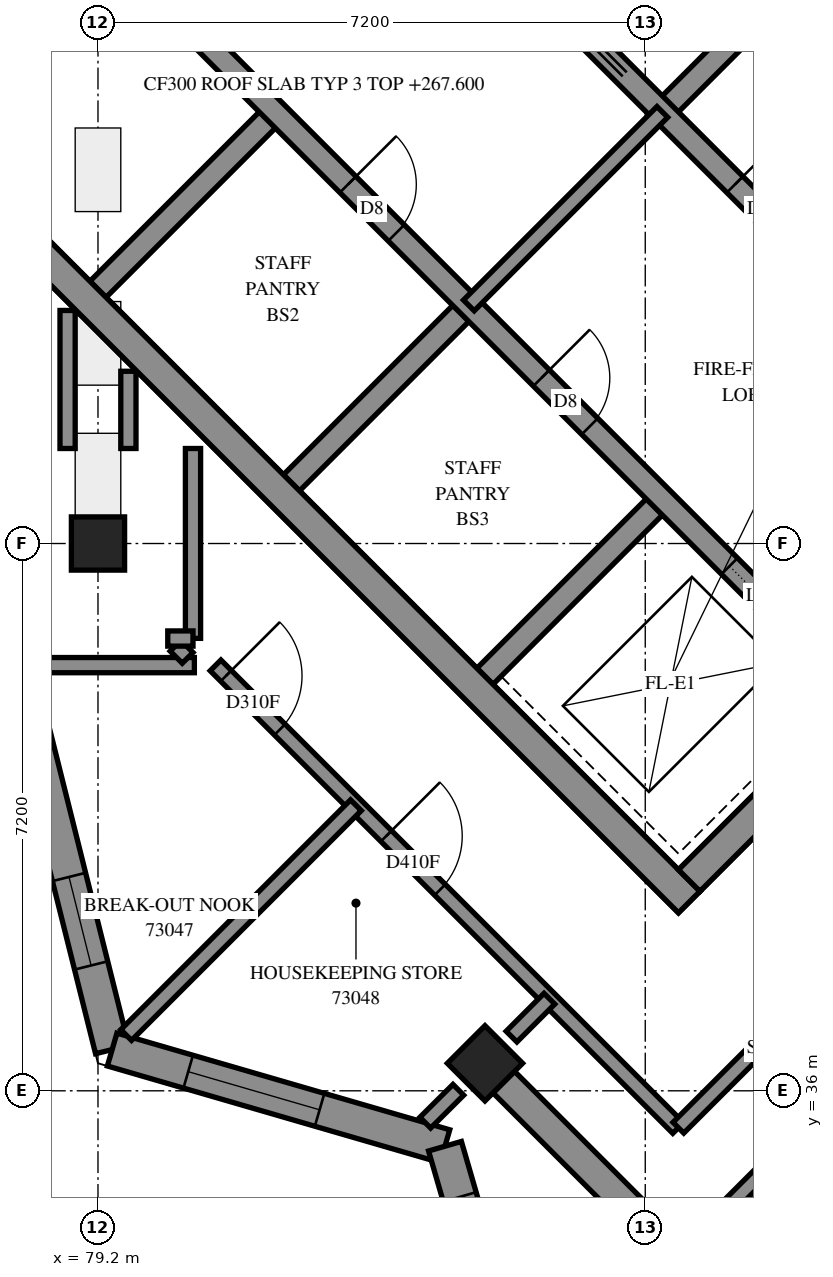
"""IFC4 building model, lengths in metres.
Left out: names, types, materials, properties, quantities, classifications, styles, units other than length and angle.
Written with IfcOpenShell. Run it as: python <this file> out.ifc"""

import sys

from ifc_helpers import new_model, si_unit, direction, frame, frame_2d, origin, origin_2d, place, context, subcontext, project, spatial, polyline, rectangle, outline, extrude, element, fill, save


model = new_model("IFC4")
c1 = context("Model", 3, precision=1e-05, world=origin(), true_north=direction((0.0, 1.0)))
c2 = subcontext(c1, "Body", "Model", "MODEL_VIEW")
j1 = project(units=[si_unit("LENGTHUNIT", "METRE"), si_unit("PLANEANGLEUNIT", "RADIAN")], contexts=[c1])
p1 = place(None, origin())
s1 = spatial("IfcSite", under=j1, at=p1, CompositionType="ELEMENT")
p2 = place(p1, origin())
s2 = spatial("IfcBuilding", under=s1, at=p2, CompositionType="ELEMENT")
p3 = place(p2, frame((0.0, 0.0, 267.6)))
s3 = spatial("IfcBuildingStorey", under=s2, at=p3, CompositionType="ELEMENT", Elevation=267.6)
for number, where, z_axis, x_axis in (
    (1, (79.2, 43.2, 0.0), (0.0, 0.0, 1.0), (1.0, 0.0, 0.0)),
    (2, (84.291, 36.362, 0.0), (0.0, 0.0, 1.0), (0.707, -0.707, 0.0)),
):
    element("IfcColumn", number, at=place(p3, frame(where, z_axis=z_axis, x_axis=x_axis)), inside=s3, PredefinedType="COLUMN", context=c2, shape_type="SweptSolid", body=[
        extrude(rectangle(XDim=0.7, YDim=0.7, at=origin_2d()), origin(), (0.0, 0.0, 1.0), 3.1),
    ])
p4 = place(p3, frame((76.23, 49.231, -0.3), z_axis=(0.0, 0.0, 1.0), x_axis=(0.7071034917, -0.7071100706, 0.0)))
e3 = element("IfcWall", 3, at=p4, inside=s3, PredefinedType="SHEAR", context=c2, shape_type="SweptSolid", body=[
    extrude(rectangle(XDim=15.2, YDim=0.4, at=frame_2d((7.6, 0.0))), origin(), (0.0, 0.0, 1.0), 2.7),
])
p5 = place(p3, frame((86.695, 59.696, -0.3), z_axis=(0.0, 0.0, 1.0), x_axis=(0.7071100706, -0.7071034917, 0.0)))
e4 = element("IfcWall", 4, at=p5, inside=s3, PredefinedType="SHEAR", context=c2, shape_type="SweptSolid", body=[
    extrude(rectangle(XDim=15.2, YDim=0.4, at=frame_2d((7.6, 0.0))), origin(), (0.0, 0.0, 1.0), 2.7),
])
p6 = place(p5, frame((10.4, 0.0, 0.3)))
e5 = element("IfcOpeningElement", 5, at=p6, cuts=e4, PredefinedType="OPENING", context=c2, shape_type="SweptSolid", body=[
    extrude(rectangle(XDim=0.8, YDim=2.1, at=frame_2d((0.4, 1.05))), frame((0.0, 0.21, 0.0), z_axis=(0.0, -1.0, 0.0), x_axis=(1.0, 0.0, 0.0)), (0.0, 0.0, 1.0), 0.42),
])
p7 = place(p3, frame((76.513, 49.231, -0.3), z_axis=(0.0, 0.0, 1.0), x_axis=(0.7071067812, 0.7071067812, 0.0)))
e6 = element("IfcWall", 6, at=p7, inside=s3, PredefinedType="SHEAR", context=c2, shape_type="SweptSolid", body=[
    extrude(rectangle(XDim=14.4, YDim=0.4, at=frame_2d((7.2, 0.0))), origin(), (0.0, 0.0, 1.0), 2.7),
])
p8 = place(p7, frame((5.65, 0.0, 0.3)))
e7 = element("IfcOpeningElement", 7, at=p8, cuts=e6, PredefinedType="OPENING", context=c2, shape_type="SweptSolid", body=[
    extrude(rectangle(XDim=1.1, YDim=2.1, at=frame_2d((0.55, 1.05))), frame((0.0, 0.21, 0.0), z_axis=(0.0, -1.0, 0.0), x_axis=(1.0, 0.0, 0.0)), (0.0, 0.0, 1.0), 0.42),
])
p9 = place(p7, frame((11.35, 0.0, 0.3)))
e8 = element("IfcOpeningElement", 8, at=p9, cuts=e6, PredefinedType="OPENING", context=c2, shape_type="SweptSolid", body=[
    extrude(rectangle(XDim=1.1, YDim=2.1, at=frame_2d((0.55, 1.05))), frame((0.0, 0.21, 0.0), z_axis=(0.0, -1.0, 0.0), x_axis=(1.0, 0.0, 0.0)), (0.0, 0.0, 1.0), 0.42),
])
p10 = place(p7, frame((0.25, 0.0, 0.0)))
e9 = element("IfcOpeningElement", 9, at=p10, cuts=e6, PredefinedType="OPENING", context=c2, shape_type="SweptSolid", body=[
    extrude(rectangle(XDim=0.9, YDim=2.1, at=frame_2d((0.45, 1.05))), frame((0.0, 0.21, 0.0), z_axis=(0.0, -1.0, 0.0), x_axis=(1.0, 0.0, 0.0)), (0.0, 0.0, 1.0), 0.42),
])
p11 = place(p3, frame((86.978, 38.766, -0.3), z_axis=(0.0, 0.0, 1.0), x_axis=(0.7071067812, 0.7071067812, 0.0)))
e10 = element("IfcWall", 10, at=p11, inside=s3, PredefinedType="SHEAR", context=c2, shape_type="SweptSolid", body=[
    extrude(rectangle(XDim=14.4, YDim=0.4, at=frame_2d((7.2, 0.0))), origin(), (0.0, 0.0, 1.0), 2.7),
])
p12 = place(p11, frame((4.55, 0.0, 0.3)))
e11 = element("IfcOpeningElement", 11, at=p12, cuts=e10, PredefinedType="OPENING", context=c2, shape_type="SweptSolid", body=[
    extrude(rectangle(XDim=1.1, YDim=2.1, at=frame_2d((0.55, 1.05))), frame((0.0, 0.21, 0.0), z_axis=(0.0, -1.0, 0.0), x_axis=(1.0, 0.0, 0.0)), (0.0, 0.0, 1.0), 0.42),
])
p13 = place(p11, frame((11.35, 0.0, 0.3)))
e12 = element("IfcOpeningElement", 12, at=p13, cuts=e10, PredefinedType="OPENING", context=c2, shape_type="SweptSolid", body=[
    extrude(rectangle(XDim=1.1, YDim=2.1, at=frame_2d((0.55, 1.05))), frame((0.0, 0.21, 0.0), z_axis=(0.0, -1.0, 0.0), x_axis=(1.0, 0.0, 0.0)), (0.0, 0.0, 1.0), 0.42),
])
p14 = place(p3, frame((79.2, 46.544, 0.0), z_axis=(0.0, 0.0, 1.0), x_axis=(0.7071219326, 0.7070916295, 0.0)))
e13 = element("IfcWall", 13, at=p14, inside=s3, PredefinedType="SOLIDWALL", context=c2, shape_type="SweptSolid", body=[
    extrude(rectangle(XDim=3.3, YDim=0.3, at=frame_2d((1.65, 0.0))), origin(), (0.0, 0.0, 1.0), 3.1),
])
p15 = place(p3, frame((81.746, 43.999, 0.0), z_axis=(0.0, 0.0, 1.0), x_axis=(0.7071067812, 0.7071067812, 0.0)))
e14 = element("IfcWall", 14, at=p15, inside=s3, PredefinedType="SOLIDWALL", context=c2, shape_type="SweptSolid", body=[
    extrude(rectangle(XDim=3.3, YDim=0.3, at=frame_2d((1.65, 0.0))), origin(), (0.0, 0.0, 1.0), 3.1),
])
p16 = place(p3, frame((86.625, 48.878, 0.0), z_axis=(0.0, 0.0, 1.0), x_axis=(0.7071067812, 0.7071067812, 0.0)))
e15 = element("IfcWall", 15, at=p16, inside=s3, PredefinedType="SOLIDWALL", context=c2, shape_type="SweptSolid", body=[
    extrude(rectangle(XDim=3.3, YDim=0.3, at=frame_2d((1.65, 0.0))), origin(), (0.0, 0.0, 1.0), 3.1),
])
p17 = place(p3, frame((84.291, 41.453, 0.0), z_axis=(0.0, 0.0, 1.0), x_axis=(0.7071067812, 0.7071067812, 0.0)))
e16 = element("IfcWall", 16, at=p17, inside=s3, PredefinedType="SOLIDWALL", context=c2, shape_type="SweptSolid", body=[
    extrude(rectangle(XDim=3.3, YDim=0.3, at=frame_2d((1.65, 0.0))), origin(), (0.0, 0.0, 1.0), 3.1),
])
p18 = place(p3, frame((78.988, 51.423, 0.0), z_axis=(0.0, 0.0, 1.0), x_axis=(0.7071067812, -0.7071067812, 0.0)))
e17 = element("IfcWall", 17, at=p18, inside=s3, PredefinedType="SOLIDWALL", context=c2, shape_type="SweptSolid", body=[
    extrude(rectangle(XDim=14.4, YDim=0.3, at=frame_2d((7.2, 0.0))), origin(), (0.0, 0.0, 1.0), 3.1),
])
p19 = place(p18, frame((4.95, 0.0, 0.0)))
e18 = element("IfcOpeningElement", 18, at=p19, cuts=e17, PredefinedType="OPENING", context=c2, shape_type="SweptSolid", body=[
    extrude(rectangle(XDim=0.9, YDim=2.1, at=frame_2d((0.45, 1.05))), frame((0.0, 0.16, 0.0), z_axis=(0.0, -1.0, 0.0), x_axis=(1.0, 0.0, 0.0)), (0.0, 0.0, 1.0), 0.32),
])
p20 = place(p18, frame((8.55, 0.0, 0.0)))
e19 = element("IfcOpeningElement", 19, at=p20, cuts=e17, PredefinedType="OPENING", context=c2, shape_type="SweptSolid", body=[
    extrude(rectangle(XDim=0.9, YDim=2.1, at=frame_2d((0.45, 1.05))), frame((0.0, 0.16, 0.0), z_axis=(0.0, -1.0, 0.0), x_axis=(1.0, 0.0, 0.0)), (0.0, 0.0, 1.0), 0.32),
])
p21 = place(p18, frame((12.05, 0.0, 0.0)))
e20 = element("IfcOpeningElement", 20, at=p21, cuts=e17, PredefinedType="OPENING", context=c2, shape_type="SweptSolid", body=[
    extrude(rectangle(XDim=1.1, YDim=2.1, at=frame_2d((0.55, 1.05))), frame((0.0, 0.16, 0.0), z_axis=(0.0, -1.0, 0.0), x_axis=(1.0, 0.0, 0.0)), (0.0, 0.0, 1.0), 0.32),
])
p22 = place(p3, frame((81.534, 53.969, 0.0), z_axis=(0.0, 0.0, 1.0), x_axis=(0.707103309, -0.7071102534, 0.0)))
e21 = element("IfcWall", 21, at=p22, inside=s3, PredefinedType="SOLIDWALL", context=c2, shape_type="SweptSolid", body=[
    extrude(rectangle(XDim=14.4, YDim=0.3, at=frame_2d((7.2, 0.0))), origin(), (0.0, 0.0, 1.0), 3.1),
])
p23 = place(p22, frame((8.55, 0.0, 0.0)))
e22 = element("IfcOpeningElement", 22, at=p23, cuts=e21, PredefinedType="OPENING", context=c2, shape_type="SweptSolid", body=[
    extrude(rectangle(XDim=0.9, YDim=2.1, at=frame_2d((0.45, 1.05))), frame((0.0, 0.16, 0.0), z_axis=(0.0, -1.0, 0.0), x_axis=(1.0, 0.0, 0.0)), (0.0, 0.0, 1.0), 0.32),
])
p24 = place(p22, frame((1.25, 0.0, 0.0)))
e23 = element("IfcOpeningElement", 23, at=p24, cuts=e21, PredefinedType="OPENING", context=c2, shape_type="SweptSolid", body=[
    extrude(rectangle(XDim=1.1, YDim=2.1, at=frame_2d((0.55, 1.05))), frame((0.0, 0.16, 0.0), z_axis=(0.0, -1.0, 0.0), x_axis=(1.0, 0.0, 0.0)), (0.0, 0.0, 1.0), 0.32),
])
p25 = place(p22, frame((4.85, 0.0, 0.0)))
e24 = element("IfcOpeningElement", 24, at=p25, cuts=e21, PredefinedType="OPENING", context=c2, shape_type="SweptSolid", body=[
    extrude(rectangle(XDim=1.1, YDim=2.1, at=frame_2d((0.55, 1.05))), frame((0.0, 0.16, 0.0), z_axis=(0.0, -1.0, 0.0), x_axis=(1.0, 0.0, 0.0)), (0.0, 0.0, 1.0), 0.32),
])
p26 = place(p22, frame((12.05, 0.0, 0.0)))
e25 = element("IfcOpeningElement", 25, at=p26, cuts=e21, PredefinedType="OPENING", context=c2, shape_type="SweptSolid", body=[
    extrude(rectangle(XDim=1.1, YDim=2.1, at=frame_2d((0.55, 1.05))), frame((0.0, 0.16, 0.0), z_axis=(0.0, -1.0, 0.0), x_axis=(1.0, 0.0, 0.0)), (0.0, 0.0, 1.0), 0.32),
])
p27 = place(p3, frame((78.255, 41.066, 0.0), z_axis=(0.0, 0.0, 1.0), x_axis=(0.2425709501, -0.9701336682, 0.0)))
e26 = element("IfcWall", 26, at=p27, inside=s3, PredefinedType="SOLIDWALL", context=c2, shape_type="SweptSolid", body=[
    extrude(outline(polyline([(0.127, -0.225), (4.792, -0.225), (4.533, 0.225), (-0.127, 0.225), (0.127, -0.225)])), origin(), (0.0, 0.0, 1.0), 3.1),
])
p28 = place(p27, frame((2.322, 0.0, 0.45)))
e27 = element("IfcOpeningElement", 27, at=p28, cuts=e26, PredefinedType="OPENING", context=c2, shape_type="SweptSolid", body=[
    extrude(rectangle(XDim=1.2, YDim=2.55, at=frame_2d((0.6, 1.275))), frame((0.0, 0.235, 0.0), z_axis=(0.0, -1.0, 0.0), x_axis=(1.0, 0.0, 0.0)), (0.0, 0.0, 1.0), 0.47),
])
p29 = place(p3, frame((79.386, 36.542, 0.0), z_axis=(0.0, 0.0, 1.0), x_axis=(0.9603399755, -0.278831726, 0.0)))
e28 = element("IfcWall", 28, at=p29, inside=s3, PredefinedType="SOLIDWALL", context=c2, shape_type="SweptSolid", body=[
    extrude(outline(polyline([(-0.129, -0.225), (4.436, -0.225), (4.684, 0.225), (0.129, 0.225), (-0.129, -0.225)])), origin(), (0.0, 0.0, 1.0), 2.6),
])
p30 = place(p29, frame((1.042, 0.0, 0.6)))
e29 = element("IfcOpeningElement", 29, at=p30, cuts=e28, PredefinedType="OPENING", context=c2, shape_type="SweptSolid", body=[
    extrude(rectangle(XDim=1.8, YDim=1.9, at=frame_2d((0.9, 0.95))), frame((0.0, 0.235, 0.0), z_axis=(0.0, -1.0, 0.0), x_axis=(1.0, 0.0, 0.0)), (0.0, 0.0, 1.0), 0.47),
])
p31 = place(p3, frame((83.765, 35.271, 0.0), z_axis=(0.0, 0.0, 1.0), x_axis=(0.278831726, -0.9603399755, 0.0)))
e30 = element("IfcWall", 30, at=p31, inside=s3, PredefinedType="SOLIDWALL", context=c2, shape_type="SweptSolid", body=[
    extrude(outline(polyline([(0.124, -0.225), (4.689, -0.225), (4.43, 0.225), (-0.124, 0.225), (0.124, -0.225)])), origin(), (0.0, 0.0, 1.0), 2.6),
])
p32 = place(p31, frame((0.695, 0.0, 0.6)))
e31 = element("IfcOpeningElement", 31, at=p32, cuts=e30, PredefinedType="OPENING", context=c2, shape_type="SweptSolid", body=[
    extrude(rectangle(XDim=1.8, YDim=1.9, at=frame_2d((0.9, 0.95))), frame((0.0, 0.235, 0.0), z_axis=(0.0, -1.0, 0.0), x_axis=(1.0, 0.0, 0.0)), (0.0, 0.0, 1.0), 0.47),
])
p33 = place(p3, frame((84.079, 46.332, 0.0), z_axis=(0.0, 0.0, 1.0), x_axis=(0.7071067812, 0.7071067812, 0.0)))
e32 = element("IfcWall", 32, at=p33, inside=s3, PredefinedType="PARTITIONING", context=c2, shape_type="SweptSolid", body=[
    extrude(rectangle(XDim=3.6, YDim=0.2, at=frame_2d((1.8, 0.0))), origin(), (0.0, 0.0, 1.0), 3.1),
])
p34 = place(p3, frame((84.965, 31.946, 0.0), z_axis=(0.0, 0.0, 1.0), x_axis=(0.7070265824, 0.7071869709, 0.0)))
e33 = element("IfcWall", 33, at=p34, inside=s3, PredefinedType="PARTITIONING", context=c2, shape_type="SweptSolid", body=[
    extrude(rectangle(XDim=11.846, YDim=0.2, at=frame_2d((5.923, 0.0))), origin(), (0.0, 0.0, 1.0), 3.1),
])
p35 = place(p3, frame((80.747, 41.597, 0.0), z_axis=(0.0, 0.0, 1.0), x_axis=(0.7071067812, -0.7071067812, 0.0)))
e34 = element("IfcWall", 34, at=p35, inside=s3, PredefinedType="PARTITIONING", context=c2, shape_type="SweptSolid", body=[
    extrude(rectangle(XDim=8.607, YDim=0.2, at=frame_2d((4.303, 0.0))), origin(), (0.0, 0.0, 1.0), 3.1),
])
p36 = place(p35, frame((0.195, 0.0, 0.0)))
e35 = element("IfcOpeningElement", 35, at=p36, cuts=e34, PredefinedType="OPENING", context=c2, shape_type="SweptSolid", body=[
    extrude(rectangle(XDim=1.0, YDim=2.1, at=frame_2d((0.5, 1.05))), frame((0.0, 0.11, 0.0), z_axis=(0.0, -1.0, 0.0), x_axis=(1.0, 0.0, 0.0)), (0.0, 0.0, 1.0), 0.22),
])
p37 = place(p35, frame((3.175, 0.0, 0.0)))
e36 = element("IfcOpeningElement", 36, at=p37, cuts=e34, PredefinedType="OPENING", context=c2, shape_type="SweptSolid", body=[
    extrude(rectangle(XDim=1.0, YDim=2.1, at=frame_2d((0.5, 1.05))), frame((0.0, 0.11, 0.0), z_axis=(0.0, -1.0, 0.0), x_axis=(1.0, 0.0, 0.0)), (0.0, 0.0, 1.0), 0.22),
])
p38 = place(p3, frame((86.836, 35.514, 0.0), z_axis=(0.0, 0.0, 1.0), x_axis=(0.7071067812, 0.7071067812, 0.0)))
e37 = element("IfcWall", 37, at=p38, inside=s3, PredefinedType="PARTITIONING", context=c2, shape_type="SweptSolid", body=[
    extrude(rectangle(XDim=7.999, YDim=0.2, at=frame_2d((3.999, 0.0))), origin(), (0.0, 0.0, 1.0), 3.1),
])
p39 = place(p38, frame((6.742, 0.0, 0.0)))
e38 = element("IfcOpeningElement", 38, at=p39, cuts=e37, PredefinedType="OPENING", context=c2, shape_type="SweptSolid", body=[
    extrude(rectangle(XDim=1.0, YDim=2.1, at=frame_2d((0.5, 1.05))), frame((0.0, 0.11, 0.0), z_axis=(0.0, -1.0, 0.0), x_axis=(1.0, 0.0, 0.0)), (0.0, 0.0, 1.0), 0.22),
])
p40 = place(p3, frame((79.57, 36.734, 0.0), z_axis=(0.0, 0.0, 1.0), x_axis=(0.7071184771, 0.7070950851, 0.0)))
e39 = element("IfcWall", 39, at=p40, inside=s3, PredefinedType="PARTITIONING", context=c2, shape_type="SweptSolid", body=[
    extrude(rectangle(XDim=4.275, YDim=0.2, at=frame_2d((2.138, 0.0))), origin(), (0.0, 0.0, 1.0), 3.1),
])
p41 = place(p3, frame((77.335, 41.6, 0.0), z_axis=(0.0, 0.0, 1.0), x_axis=(1.0, 0.0, 0.0)))
e40 = element("IfcWall", 40, at=p41, inside=s3, PredefinedType="PARTITIONING", context=c2, shape_type="SweptSolid", body=[
    extrude(rectangle(XDim=3.132, YDim=0.2, at=frame_2d((1.566, 0.0))), origin(), (0.0, 0.0, 1.0), 3.1),
])
p42 = place(p3, frame((80.45, 41.952, 0.0), z_axis=(0.0, 0.0, 1.0), x_axis=(0.0, 1.0, 0.0)))
e41 = element("IfcWall", 41, at=p42, inside=s3, PredefinedType="PARTITIONING", context=c2, shape_type="SweptSolid", body=[
    extrude(rectangle(XDim=2.498, YDim=0.2, at=frame_2d((1.249, 0.0))), origin(), (0.0, 0.0, 1.0), 3.1),
])
p43 = place(p3, frame((78.8, 44.45, 0.0), z_axis=(0.0, 0.0, 1.0), x_axis=(0.0, 1.0, 0.0)))
e42 = element("IfcWall", 42, at=p43, inside=s3, PredefinedType="PARTITIONING", context=c2, shape_type="SweptSolid", body=[
    extrude(rectangle(XDim=1.816, YDim=0.2, at=frame_2d((0.908, 0.0))), origin(), (0.0, 0.0, 1.0), 3.1),
])
p44 = place(p3, frame((79.6, 44.45, 0.0), z_axis=(0.0, 0.0, 1.0), x_axis=(0.0, 1.0, 0.0)))
e43 = element("IfcWall", 43, at=p44, inside=s3, PredefinedType="PARTITIONING", context=c2, shape_type="SweptSolid", body=[
    extrude(rectangle(XDim=1.016, YDim=0.2, at=frame_2d((0.508, 0.0))), origin(), (0.0, 0.0, 1.0), 3.1),
])
p45 = place(p3, frame((84.641, 36.713, 0.0), z_axis=(0.0, 0.0, 1.0), x_axis=(0.7071067812, 0.7071067812, 0.0)))
e44 = element("IfcWall", 44, at=p45, inside=s3, PredefinedType="PARTITIONING", context=c2, shape_type="SweptSolid", body=[
    extrude(rectangle(XDim=0.704, YDim=0.2, at=frame_2d((0.352, 0.0))), origin(), (0.0, 0.0, 1.0), 3.1),
])
p46 = place(p3, frame((83.506, 35.581, 0.0), z_axis=(0.0, 0.0, 1.0), x_axis=(0.7089790393, 0.7052295526, 0.0)))
e45 = element("IfcWall", 45, at=p46, inside=s3, PredefinedType="PARTITIONING", context=c2, shape_type="SweptSolid", body=[
    extrude(rectangle(XDim=0.613, YDim=0.2, at=frame_2d((0.307, 0.0))), origin(), (0.0, 0.0, 1.0), 2.6),
])
p47 = place(p3, frame((80.221, 41.855, 0.0), z_axis=(0.0, 0.0, 1.0), x_axis=(0.7068844555, -0.707329037, 0.0)))
e46 = element("IfcWall", 46, at=p47, inside=s3, PredefinedType="PARTITIONING", context=c2, shape_type="SweptSolid", body=[
    extrude(rectangle(XDim=0.225, YDim=0.2, at=frame_2d((0.112, 0.0))), origin(), (0.0, 0.0, 1.0), 3.1),
])
p48 = place(p3, frame((80.118, 41.95, 0.0), z_axis=(0.0, 0.0, 1.0), x_axis=(1.0, 0.0, 0.0)))
e47 = element("IfcWall", 47, at=p48, inside=s3, PredefinedType="PARTITIONING", context=c2, shape_type="SweptSolid", body=[
    extrude(rectangle(XDim=0.332, YDim=0.2, at=frame_2d((0.166, 0.0))), origin(), (0.0, 0.0, 1.0), 3.1),
])
p49 = place(p28, origin())
e48 = element("IfcWindow", 48, at=p49, inside=s3, PartitioningType="SINGLE_PANEL", PredefinedType="WINDOW", context=c2, shape_type="SweptSolid", body=[
    extrude(rectangle(XDim=1.2, YDim=2.55, at=frame_2d((0.6, 1.275))), frame((0.0, 0.205, 0.0), z_axis=(0.0, -1.0, 0.0), x_axis=(1.0, 0.0, 0.0)), (0.0, 0.0, 1.0), 0.06),
])
fill(e27, e48)
p50 = place(p30, origin())
e49 = element("IfcWindow", 49, at=p50, inside=s3, PartitioningType="SINGLE_PANEL", PredefinedType="WINDOW", context=c2, shape_type="SweptSolid", body=[
    extrude(rectangle(XDim=1.8, YDim=1.9, at=frame_2d((0.9, 0.95))), frame((0.0, 0.205, 0.0), z_axis=(0.0, -1.0, 0.0), x_axis=(1.0, 0.0, 0.0)), (0.0, 0.0, 1.0), 0.06),
])
fill(e29, e49)
p51 = place(p32, origin())
e50 = element("IfcWindow", 50, at=p51, inside=s3, PartitioningType="SINGLE_PANEL", PredefinedType="WINDOW", context=c2, shape_type="SweptSolid", body=[
    extrude(rectangle(XDim=1.8, YDim=1.9, at=frame_2d((0.9, 0.95))), frame((0.0, 0.205, 0.0), z_axis=(0.0, -1.0, 0.0), x_axis=(1.0, 0.0, 0.0)), (0.0, 0.0, 1.0), 0.06),
])
fill(e31, e50)
p52 = place(p19, origin())
e51 = element("IfcDoor", 51, at=p52, inside=s3, OperationType="SINGLE_SWING_LEFT", PredefinedType="DOOR", context=c2, shape_type="SweptSolid", body=[
    extrude(rectangle(XDim=0.9, YDim=2.1, at=frame_2d((0.45, 1.05))), frame((0.0, 0.025, 0.0), z_axis=(0.0, -1.0, 0.0), x_axis=(1.0, 0.0, 0.0)), (0.0, 0.0, 1.0), 0.05),
])
fill(e18, e51)
p53 = place(p20, origin())
e52 = element("IfcDoor", 52, at=p53, inside=s3, OperationType="SINGLE_SWING_LEFT", PredefinedType="DOOR", context=c2, shape_type="SweptSolid", body=[
    extrude(rectangle(XDim=0.9, YDim=2.1, at=frame_2d((0.45, 1.05))), frame((0.0, 0.025, 0.0), z_axis=(0.0, -1.0, 0.0), x_axis=(1.0, 0.0, 0.0)), (0.0, 0.0, 1.0), 0.05),
])
fill(e19, e52)
p54 = place(p23, origin())
e53 = element("IfcDoor", 53, at=p54, inside=s3, OperationType="SINGLE_SWING_LEFT", PredefinedType="DOOR", context=c2, shape_type="SweptSolid", body=[
    extrude(rectangle(XDim=0.9, YDim=2.1, at=frame_2d((0.45, 1.05))), frame((0.0, 0.025, 0.0), z_axis=(0.0, -1.0, 0.0), x_axis=(1.0, 0.0, 0.0)), (0.0, 0.0, 1.0), 0.05),
])
fill(e22, e53)
p55 = place(p21, origin())
e54 = element("IfcDoor", 54, at=p55, inside=s3, OperationType="SLIDING_TO_RIGHT", PredefinedType="DOOR", context=c2, shape_type="SweptSolid", body=[
    extrude(rectangle(XDim=1.1, YDim=2.1, at=frame_2d((0.55, 1.05))), frame((0.0, 0.025, 0.0), z_axis=(0.0, -1.0, 0.0), x_axis=(1.0, 0.0, 0.0)), (0.0, 0.0, 1.0), 0.05),
])
fill(e20, e54)
p56 = place(p36, origin())
e55 = element("IfcDoor", 55, at=p56, inside=s3, OperationType="SINGLE_SWING_LEFT", PredefinedType="DOOR", context=c2, shape_type="SweptSolid", body=[
    extrude(rectangle(XDim=1.0, YDim=2.1, at=frame_2d((0.5, 1.05))), frame((0.0, 0.025, 0.0), z_axis=(0.0, -1.0, 0.0), x_axis=(1.0, 0.0, 0.0)), (0.0, 0.0, 1.0), 0.05),
])
fill(e35, e55)
p57 = place(p37, origin())
e56 = element("IfcDoor", 56, at=p57, inside=s3, OperationType="SINGLE_SWING_LEFT", PredefinedType="DOOR", context=c2, shape_type="SweptSolid", body=[
    extrude(rectangle(XDim=1.0, YDim=2.1, at=frame_2d((0.5, 1.05))), frame((0.0, 0.025, 0.0), z_axis=(0.0, -1.0, 0.0), x_axis=(1.0, 0.0, 0.0)), (0.0, 0.0, 1.0), 0.05),
])
fill(e36, e56)
save(model, sys.argv[1])
